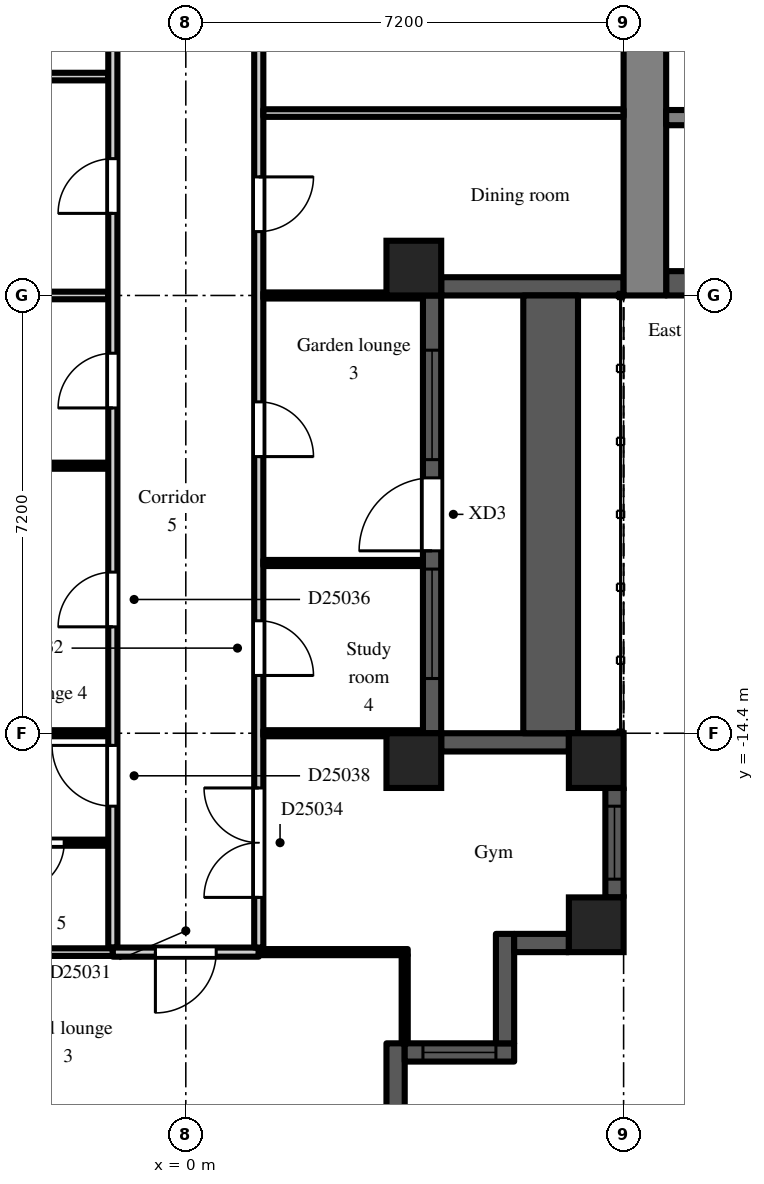
"""IFC4 building model, lengths in metres.
Left out: names, types, materials, properties, quantities, classifications, styles, units other than length and angle.
Written with IfcOpenShell. Run it as: python <this file> out.ifc"""

import sys

from ifc_helpers import new_model, si_unit, direction, frame, frame_2d, origin, origin_2d, place, context, subcontext, project, spatial, rectangle, extrude, element, fill, save


model = new_model("IFC4")
c1 = context("Model", 3, precision=1e-05, world=origin(), true_north=direction((0.0, 1.0)))
c2 = subcontext(c1, "Body", "Model", "MODEL_VIEW")
j1 = project(units=[si_unit("LENGTHUNIT", "METRE"), si_unit("PLANEANGLEUNIT", "RADIAN")], contexts=[c1])
p1 = place(None, origin())
s1 = spatial("IfcSite", under=j1, at=p1, CompositionType="ELEMENT")
p2 = place(p1, origin())
s2 = spatial("IfcBuilding", under=s1, at=p2, CompositionType="ELEMENT")
p3 = place(p2, frame((0.0, 0.0, 170.7)))
s3 = spatial("IfcBuildingStorey", under=s2, at=p3, CompositionType="ELEMENT", Elevation=170.7)
for number, where, z_axis, x_axis in (
    (1, (3.75, -14.85, 0.0), (0.0, 0.0, 1.0), (1.0, 0.0, 0.0)),
    (2, (3.75, -6.75, 0.0), (0.0, 0.0, 1.0), (1.0, 0.0, 0.0)),
    (3, (6.75, -17.55, 0.0), (0.0, 0.0, 1.0), (1.0, 0.0, 0.0)),
    (4, (6.75, -14.85, 0.0), (0.0, 0.0, 1.0), (1.0, 0.0, 0.0)),
):
    element("IfcColumn", number, at=place(p3, frame(where, z_axis=z_axis, x_axis=x_axis)), inside=s3, PredefinedType="COLUMN", context=c2, shape_type="SweptSolid", body=[
        extrude(rectangle(XDim=0.9, YDim=0.9, at=origin_2d()), origin(), (0.0, 0.0, 1.0), 3.0),
    ])
p4 = place(p3, frame((3.45, -20.7, 0.0), z_axis=(0.0, 0.0, 1.0), x_axis=(0.0, 1.0, 0.0)))
e5 = element("IfcWall", 5, at=p4, inside=s3, PredefinedType="SOLIDWALL", context=c2, shape_type="SweptSolid", body=[
    extrude(rectangle(XDim=1.2, YDim=0.3, at=frame_2d((0.6, 0.0))), origin(), (0.0, 0.0, 1.0), 2.6),
])
p5 = place(p3, frame((3.6, -19.65, 0.0), z_axis=(0.0, 0.0, 1.0), x_axis=(1.0, 0.0, 0.0)))
e6 = element("IfcWall", 6, at=p5, inside=s3, PredefinedType="SOLIDWALL", context=c2, shape_type="SweptSolid", body=[
    extrude(rectangle(XDim=1.8, YDim=0.3, at=frame_2d((0.9, 0.0))), origin(), (0.0, 0.0, 1.0), 2.6),
])
p6 = place(p5, frame((0.3, 0.0, 0.2)))
e7 = element("IfcOpeningElement", 7, at=p6, cuts=e6, PredefinedType="OPENING", context=c2, shape_type="SweptSolid", body=[
    extrude(rectangle(XDim=1.2, YDim=1.85, at=frame_2d((0.6, 0.925))), frame((0.0, 0.16, 0.0), z_axis=(0.0, -1.0, 0.0), x_axis=(1.0, 0.0, 0.0)), (0.0, 0.0, 1.0), 0.32),
])
p7 = place(p3, frame((5.25, -19.5, 0.0), z_axis=(0.0, 0.0, 1.0), x_axis=(0.0, 1.0, 0.0)))
e8 = element("IfcWall", 8, at=p7, inside=s3, PredefinedType="SOLIDWALL", context=c2, shape_type="SweptSolid", body=[
    extrude(rectangle(XDim=1.8, YDim=0.3, at=frame_2d((0.9, 0.0))), origin(), (0.0, 0.0, 1.0), 2.6),
])
p8 = place(p3, frame((5.4, -17.85, 0.0), z_axis=(0.0, 0.0, 1.0), x_axis=(1.0, 0.0, 0.0)))
e9 = element("IfcWall", 9, at=p8, inside=s3, PredefinedType="SOLIDWALL", context=c2, shape_type="SweptSolid", body=[
    extrude(rectangle(XDim=0.9, YDim=0.3, at=frame_2d((0.45, 0.0))), origin(), (0.0, 0.0, 1.0), 2.6),
])
p9 = place(p3, frame((7.05, -17.1, 0.0), z_axis=(0.0, 0.0, 1.0), x_axis=(0.0, 1.0, 0.0)))
e10 = element("IfcWall", 10, at=p9, inside=s3, PredefinedType="SOLIDWALL", context=c2, shape_type="SweptSolid", body=[
    extrude(rectangle(XDim=1.8, YDim=0.3, at=frame_2d((0.9, 0.0))), origin(), (0.0, 0.0, 1.0), 2.2),
])
p10 = place(p9, frame((0.3, 0.0, 0.2)))
e11 = element("IfcOpeningElement", 11, at=p10, cuts=e10, PredefinedType="OPENING", context=c2, shape_type="SweptSolid", body=[
    extrude(rectangle(XDim=1.2, YDim=1.85, at=frame_2d((0.6, 0.925))), frame((0.0, 0.16, 0.0), z_axis=(0.0, -1.0, 0.0), x_axis=(1.0, 0.0, 0.0)), (0.0, 0.0, 1.0), 0.32),
])
p11 = place(p3, frame((6.3, -14.55, 0.0), z_axis=(0.0, 0.0, 1.0), x_axis=(-1.0, 0.0, 0.0)))
e12 = element("IfcWall", 12, at=p11, inside=s3, PredefinedType="SOLIDWALL", context=c2, shape_type="SweptSolid", body=[
    extrude(rectangle(XDim=2.1, YDim=0.3, at=frame_2d((1.05, 0.0))), origin(), (0.0, 0.0, 1.0), 2.2),
])
p12 = place(p3, frame((4.05, -14.4, 0.0), z_axis=(0.0, 0.0, 1.0), x_axis=(0.0, 1.0, 0.0)))
e13 = element("IfcWall", 13, at=p12, inside=s3, PredefinedType="SOLIDWALL", context=c2, shape_type="SweptSolid", body=[
    extrude(rectangle(XDim=7.2, YDim=0.3, at=frame_2d((3.6, 0.0))), origin(), (0.0, 0.0, 1.0), 2.2),
])
p13 = place(p12, frame((3.0, 0.0, 0.0)))
e14 = element("IfcOpeningElement", 14, at=p13, cuts=e13, PredefinedType="OPENING", context=c2, shape_type="SweptSolid", body=[
    extrude(rectangle(XDim=1.2, YDim=2.05, at=frame_2d((0.6, 1.025))), frame((0.0, 0.16, 0.0), z_axis=(0.0, -1.0, 0.0), x_axis=(1.0, 0.0, 0.0)), (0.0, 0.0, 1.0), 0.32),
])
p14 = place(p12, frame((0.9, 0.0, 0.2)))
e15 = element("IfcOpeningElement", 15, at=p14, cuts=e13, PredefinedType="OPENING", context=c2, shape_type="SweptSolid", body=[
    extrude(rectangle(XDim=1.8, YDim=1.85, at=frame_2d((0.9, 0.925))), frame((0.0, 0.16, 0.0), z_axis=(0.0, -1.0, 0.0), x_axis=(1.0, 0.0, 0.0)), (0.0, 0.0, 1.0), 0.32),
])
p15 = place(p12, frame((4.5, 0.0, 0.2)))
e16 = element("IfcOpeningElement", 16, at=p15, cuts=e13, PredefinedType="OPENING", context=c2, shape_type="SweptSolid", body=[
    extrude(rectangle(XDim=1.8, YDim=1.85, at=frame_2d((0.9, 0.925))), frame((0.0, 0.16, 0.0), z_axis=(0.0, -1.0, 0.0), x_axis=(1.0, 0.0, 0.0)), (0.0, 0.0, 1.0), 0.32),
])
p16 = place(p3, frame((4.2, -7.05, 0.0), z_axis=(0.0, 0.0, 1.0), x_axis=(1.0, 0.0, 0.0)))
e17 = element("IfcWall", 17, at=p16, inside=s3, PredefinedType="SOLIDWALL", context=c2, shape_type="SweptSolid", body=[
    extrude(rectangle(XDim=3.0, YDim=0.3, at=frame_2d((1.5, 0.0))), origin(), (0.0, 0.0, 1.0), 2.2),
])
p17 = place(p3, frame((6.0, -14.4, 0.0), z_axis=(0.0, 0.0, 1.0), x_axis=(0.0, 1.0, 0.0)))
e18 = element("IfcWall", 18, at=p17, inside=s3, PredefinedType="PARAPET", context=c2, shape_type="SweptSolid", body=[
    extrude(rectangle(XDim=7.2, YDim=0.9, at=frame_2d((3.6, 0.0))), origin(), (0.0, 0.0, 1.0), 0.8),
])
p18 = place(p3, frame((7.55, -7.2, 0.0), z_axis=(0.0, 0.0, 1.0), x_axis=(0.0, 1.0, 0.0)))
e19 = element("IfcWall", 19, at=p18, inside=s3, PredefinedType="SHEAR", context=c2, shape_type="SweptSolid", body=[
    extrude(rectangle(XDim=14.4, YDim=0.7, at=frame_2d((7.2, 0.0))), origin(), (0.0, 0.0, 1.0), 2.6),
])
p19 = place(p18, frame((6.0, 0.0, 0.0)))
e20 = element("IfcOpeningElement", 20, at=p19, cuts=e19, PredefinedType="OPENING", context=c2, shape_type="SweptSolid", body=[
    extrude(rectangle(XDim=2.4, YDim=2.2, at=frame_2d((1.2, 1.1))), frame((0.0, 0.36, 0.0), z_axis=(0.0, -1.0, 0.0), x_axis=(1.0, 0.0, 0.0)), (0.0, 0.0, 1.0), 0.72),
])
p20 = place(p3, frame((7.9, -7.0, 0.0), z_axis=(0.0, 0.0, 1.0), x_axis=(1.0, 0.0, 0.0)))
e21 = element("IfcWall", 21, at=p20, inside=s3, PredefinedType="SHEAR", context=c2, shape_type="SweptSolid", body=[
    extrude(rectangle(XDim=12.95, YDim=0.4, at=frame_2d((6.475, 0.0))), origin(), (0.0, 0.0, 1.0), 2.6),
])
p21 = place(p3, frame((7.9, -4.275, 0.0), z_axis=(0.0, 0.0, 1.0), x_axis=(1.0, 0.0, 0.0)))
e22 = element("IfcWall", 22, at=p21, inside=s3, PredefinedType="SHEAR", context=c2, shape_type="SweptSolid", body=[
    extrude(rectangle(XDim=1.95, YDim=0.25, at=frame_2d((0.975, 0.0))), origin(), (0.0, 0.0, 1.0), 2.6),
])
p22 = place(p3, frame((-5.938, -3.6, 0.0), z_axis=(0.0, 0.0, 1.0), x_axis=(1.0, 0.0, 0.0)))
e23 = element("IfcWall", 23, at=p22, inside=s3, PredefinedType="PARTITIONING", context=c2, shape_type="SweptSolid", body=[
    extrude(rectangle(XDim=4.663, YDim=0.125, at=frame_2d((2.331, 0.0))), origin(), (0.0, 0.0, 1.0), 2.6),
])
for number, where, z_axis, x_axis in (
    (24, (-3.9, -14.4, 0.0), (0.0, 0.0, 1.0), (1.0, 0.0, 0.0)),
    (25, (-3.9, -10.0, 0.0), (0.0, 0.0, 1.0), (1.0, 0.0, 0.0)),
):
    element("IfcWall", number, at=place(p3, frame(where, z_axis=z_axis, x_axis=x_axis)), inside=s3, PredefinedType="PARTITIONING", context=c2, shape_type="SweptSolid", body=[
        extrude(rectangle(XDim=2.625, YDim=0.1, at=frame_2d((1.312, 0.0))), origin(), (0.0, 0.0, 1.0), 2.6),
    ])
p23 = place(p3, frame((-3.9, -7.2, 0.0), z_axis=(0.0, 0.0, 1.0), x_axis=(1.0, 0.0, 0.0)))
e26 = element("IfcWall", 26, at=p23, inside=s3, PredefinedType="PARTITIONING", context=c2, shape_type="SweptSolid", body=[
    extrude(rectangle(XDim=2.625, YDim=0.125, at=frame_2d((1.312, 0.0))), origin(), (0.0, 0.0, 1.0), 2.6),
])
p24 = place(p3, frame((-3.55, -18.0, 0.0), z_axis=(0.0, 0.0, 1.0), x_axis=(1.0, 0.0, 0.0)))
e27 = element("IfcWall", 27, at=p24, inside=s3, PredefinedType="PARTITIONING", context=c2, shape_type="SweptSolid", body=[
    extrude(rectangle(XDim=2.35, YDim=0.125, at=frame_2d((1.175, 0.0))), origin(), (0.0, 0.0, 1.0), 2.6),
])
p25 = place(p3, frame((-3.55, -16.2, 0.0), z_axis=(0.0, 0.0, 1.0), x_axis=(1.0, 0.0, 0.0)))
e28 = element("IfcWall", 28, at=p25, inside=s3, PredefinedType="PARTITIONING", context=c2, shape_type="SweptSolid", body=[
    extrude(rectangle(XDim=2.275, YDim=0.1, at=frame_2d((1.138, 0.0))), origin(), (0.0, 0.0, 1.0), 2.6),
])
p26 = place(p25, frame((0.75, 0.0, 0.0)))
e29 = element("IfcOpeningElement", 29, at=p26, cuts=e28, PredefinedType="OPENING", context=c2, shape_type="SweptSolid", body=[
    extrude(rectangle(XDim=0.8, YDim=2.1, at=frame_2d((0.4, 1.05))), frame((0.0, 0.06, 0.0), z_axis=(0.0, -1.0, 0.0), x_axis=(1.0, 0.0, 0.0)), (0.0, 0.0, 1.0), 0.12),
])
p27 = place(p3, frame((-1.2, -17.925, 0.0), z_axis=(0.0, 0.0, 1.0), x_axis=(0.0, 1.0, 0.0)))
e30 = element("IfcWall", 30, at=p27, inside=s3, PredefinedType="PARTITIONING", context=c2, shape_type="SweptSolid", body=[
    extrude(rectangle(XDim=16.65, YDim=0.15, at=frame_2d((8.325, 0.0))), origin(), (0.0, 0.0, 1.0), 2.6),
])
p28 = place(p27, frame((15.075, 0.0, 0.0)))
e31 = element("IfcOpeningElement", 31, at=p28, cuts=e30, PredefinedType="OPENING", context=c2, shape_type="SweptSolid", body=[
    extrude(rectangle(XDim=0.9, YDim=2.1, at=frame_2d((0.45, 1.05))), frame((0.0, 0.085, 0.0), z_axis=(0.0, -1.0, 0.0), x_axis=(1.0, 0.0, 0.0)), (0.0, 0.0, 1.0), 0.17),
])
p29 = place(p27, frame((12.075, 0.0, 0.0)))
e32 = element("IfcOpeningElement", 32, at=p29, cuts=e30, PredefinedType="OPENING", context=c2, shape_type="SweptSolid", body=[
    extrude(rectangle(XDim=0.9, YDim=2.1, at=frame_2d((0.45, 1.05))), frame((0.0, 0.085, 0.0), z_axis=(0.0, -1.0, 0.0), x_axis=(1.0, 0.0, 0.0)), (0.0, 0.0, 1.0), 0.17),
])
p30 = place(p27, frame((8.875, 0.0, 0.0)))
e33 = element("IfcOpeningElement", 33, at=p30, cuts=e30, PredefinedType="OPENING", context=c2, shape_type="SweptSolid", body=[
    extrude(rectangle(XDim=0.9, YDim=2.1, at=frame_2d((0.45, 1.05))), frame((0.0, 0.085, 0.0), z_axis=(0.0, -1.0, 0.0), x_axis=(1.0, 0.0, 0.0)), (0.0, 0.0, 1.0), 0.17),
])
p31 = place(p27, frame((5.275, 0.0, 0.0)))
e34 = element("IfcOpeningElement", 34, at=p31, cuts=e30, PredefinedType="OPENING", context=c2, shape_type="SweptSolid", body=[
    extrude(rectangle(XDim=0.9, YDim=2.1, at=frame_2d((0.45, 1.05))), frame((0.0, 0.085, 0.0), z_axis=(0.0, -1.0, 0.0), x_axis=(1.0, 0.0, 0.0)), (0.0, 0.0, 1.0), 0.17),
])
p32 = place(p27, frame((2.325, 0.0, 0.0)))
e35 = element("IfcOpeningElement", 35, at=p32, cuts=e30, PredefinedType="OPENING", context=c2, shape_type="SweptSolid", body=[
    extrude(rectangle(XDim=1.0, YDim=2.1, at=frame_2d((0.5, 1.05))), frame((0.0, 0.085, 0.0), z_axis=(0.0, -1.0, 0.0), x_axis=(1.0, 0.0, 0.0)), (0.0, 0.0, 1.0), 0.17),
])
p33 = place(p3, frame((-1.2, -18.0, 0.0), z_axis=(0.0, 0.0, 1.0), x_axis=(1.0, 0.0, 0.0)))
e36 = element("IfcWall", 36, at=p33, inside=s3, PredefinedType="PARTITIONING", context=c2, shape_type="SweptSolid", body=[
    extrude(rectangle(XDim=2.4, YDim=0.15, at=frame_2d((1.2, 0.0))), origin(), (0.0, 0.0, 1.0), 2.6),
])
p34 = place(p33, frame((0.7, 0.0, 0.0)))
e37 = element("IfcOpeningElement", 37, at=p34, cuts=e36, PredefinedType="OPENING", context=c2, shape_type="SweptSolid", body=[
    extrude(rectangle(XDim=1.0, YDim=2.1, at=frame_2d((0.5, 1.05))), frame((0.0, 0.085, 0.0), z_axis=(0.0, -1.0, 0.0), x_axis=(1.0, 0.0, 0.0)), (0.0, 0.0, 1.0), 0.17),
])
p35 = place(p3, frame((1.2, -17.925, 0.0), z_axis=(0.0, 0.0, 1.0), x_axis=(0.0, 1.0, 0.0)))
e38 = element("IfcWall", 38, at=p35, inside=s3, PredefinedType="PARTITIONING", context=c2, shape_type="SweptSolid", body=[
    extrude(rectangle(XDim=16.8, YDim=0.15, at=frame_2d((8.4, 0.0))), origin(), (0.0, 0.0, 1.0), 2.6),
])
p36 = place(p35, frame((11.775, 0.0, 0.0)))
e39 = element("IfcOpeningElement", 39, at=p36, cuts=e38, PredefinedType="OPENING", context=c2, shape_type="SweptSolid", body=[
    extrude(rectangle(XDim=0.9, YDim=2.1, at=frame_2d((0.45, 1.05))), frame((0.0, 0.085, 0.0), z_axis=(0.0, -1.0, 0.0), x_axis=(1.0, 0.0, 0.0)), (0.0, 0.0, 1.0), 0.17),
])
p37 = place(p35, frame((4.475, 0.0, 0.0)))
e40 = element("IfcOpeningElement", 40, at=p37, cuts=e38, PredefinedType="OPENING", context=c2, shape_type="SweptSolid", body=[
    extrude(rectangle(XDim=0.9, YDim=2.1, at=frame_2d((0.45, 1.05))), frame((0.0, 0.085, 0.0), z_axis=(0.0, -1.0, 0.0), x_axis=(1.0, 0.0, 0.0)), (0.0, 0.0, 1.0), 0.17),
])
p38 = place(p35, frame((8.075, 0.0, 0.0)))
e41 = element("IfcOpeningElement", 41, at=p38, cuts=e38, PredefinedType="OPENING", context=c2, shape_type="SweptSolid", body=[
    extrude(rectangle(XDim=0.9, YDim=2.1, at=frame_2d((0.45, 1.05))), frame((0.0, 0.085, 0.0), z_axis=(0.0, -1.0, 0.0), x_axis=(1.0, 0.0, 0.0)), (0.0, 0.0, 1.0), 0.17),
])
p39 = place(p35, frame((0.825, 0.0, 0.0)))
e42 = element("IfcOpeningElement", 42, at=p39, cuts=e38, PredefinedType="OPENING", context=c2, shape_type="SweptSolid", body=[
    extrude(rectangle(XDim=1.8, YDim=2.1, at=frame_2d((0.9, 1.05))), frame((0.0, 0.085, 0.0), z_axis=(0.0, -1.0, 0.0), x_axis=(1.0, 0.0, 0.0)), (0.0, 0.0, 1.0), 0.17),
])
p40 = place(p3, frame((1.2, -18.0, 0.0), z_axis=(0.0, 0.0, 1.0), x_axis=(1.0, 0.0, 0.0)))
e43 = element("IfcWall", 43, at=p40, inside=s3, PredefinedType="PARTITIONING", context=c2, shape_type="SweptSolid", body=[
    extrude(rectangle(XDim=2.45, YDim=0.1, at=frame_2d((1.225, 0.0))), origin(), (0.0, 0.0, 1.0), 2.6),
])
for number, where, z_axis, x_axis in (
    (44, (1.275, -14.4, 0.0), (0.0, 0.0, 1.0), (1.0, 0.0, 0.0)),
    (45, (1.275, -11.6, 0.0), (0.0, 0.0, 1.0), (1.0, 0.0, 0.0)),
    (46, (1.275, -7.2, 0.0), (0.0, 0.0, 1.0), (1.0, 0.0, 0.0)),
):
    element("IfcWall", number, at=place(p3, frame(where, z_axis=z_axis, x_axis=x_axis)), inside=s3, PredefinedType="PARTITIONING", context=c2, shape_type="SweptSolid", body=[
        extrude(rectangle(XDim=2.625, YDim=0.1, at=frame_2d((1.312, 0.0))), origin(), (0.0, 0.0, 1.0), 2.6),
    ])
p41 = place(p3, frame((1.275, -4.2, 0.0), z_axis=(0.0, 0.0, 1.0), x_axis=(1.0, 0.0, 0.0)))
e47 = element("IfcWall", 47, at=p41, inside=s3, PredefinedType="PARTITIONING", context=c2, shape_type="SweptSolid", body=[
    extrude(rectangle(XDim=5.925, YDim=0.125, at=frame_2d((2.962, 0.0))), origin(), (0.0, 0.0, 1.0), 2.6),
])
p42 = place(p3, frame((3.6, -19.5, 0.0), z_axis=(0.0, 0.0, 1.0), x_axis=(0.0, 1.0, 0.0)))
e48 = element("IfcWall", 48, at=p42, inside=s3, PredefinedType="PARTITIONING", context=c2, shape_type="SweptSolid", body=[
    extrude(rectangle(XDim=1.45, YDim=0.1, at=frame_2d((0.725, 0.0))), origin(), (0.0, 0.0, 1.0), 2.6),
])
p43 = place(p6, origin())
e49 = element("IfcWindow", 49, at=p43, inside=s3, PartitioningType="SINGLE_PANEL", PredefinedType="WINDOW", context=c2, shape_type="SweptSolid", body=[
    extrude(rectangle(XDim=1.2, YDim=1.85, at=frame_2d((0.6, 0.925))), frame((0.0, 0.03, 0.0), z_axis=(0.0, -1.0, 0.0), x_axis=(1.0, 0.0, 0.0)), (0.0, 0.0, 1.0), 0.06),
])
fill(e7, e49)
p44 = place(p10, origin())
e50 = element("IfcWindow", 50, at=p44, inside=s3, PartitioningType="SINGLE_PANEL", PredefinedType="WINDOW", context=c2, shape_type="SweptSolid", body=[
    extrude(rectangle(XDim=1.2, YDim=1.85, at=frame_2d((0.6, 0.925))), frame((0.0, 0.03, 0.0), z_axis=(0.0, -1.0, 0.0), x_axis=(1.0, 0.0, 0.0)), (0.0, 0.0, 1.0), 0.06),
])
fill(e11, e50)
p45 = place(p13, origin())
e51 = element("IfcDoor", 51, at=p45, inside=s3, OperationType="SINGLE_SWING_LEFT", PredefinedType="DOOR", context=c2, shape_type="SweptSolid", body=[
    extrude(rectangle(XDim=1.2, YDim=2.05, at=frame_2d((0.6, 1.025))), frame((0.0, 0.025, 0.0), z_axis=(0.0, -1.0, 0.0), x_axis=(1.0, 0.0, 0.0)), (0.0, 0.0, 1.0), 0.05),
])
fill(e14, e51)
p46 = place(p14, origin())
e52 = element("IfcWindow", 52, at=p46, inside=s3, PartitioningType="SINGLE_PANEL", PredefinedType="WINDOW", context=c2, shape_type="SweptSolid", body=[
    extrude(rectangle(XDim=1.8, YDim=1.85, at=frame_2d((0.9, 0.925))), frame((0.0, 0.03, 0.0), z_axis=(0.0, -1.0, 0.0), x_axis=(1.0, 0.0, 0.0)), (0.0, 0.0, 1.0), 0.06),
])
fill(e15, e52)
p47 = place(p15, origin())
e53 = element("IfcWindow", 53, at=p47, inside=s3, PartitioningType="SINGLE_PANEL", PredefinedType="WINDOW", context=c2, shape_type="SweptSolid", body=[
    extrude(rectangle(XDim=1.8, YDim=1.85, at=frame_2d((0.9, 0.925))), frame((0.0, 0.03, 0.0), z_axis=(0.0, -1.0, 0.0), x_axis=(1.0, 0.0, 0.0)), (0.0, 0.0, 1.0), 0.06),
])
fill(e16, e53)
p48 = place(p36, frame((0.9, 0.0, 0.0), z_axis=(0.0, 0.0, 1.0), x_axis=(-1.0, 0.0, 0.0)))
e54 = element("IfcDoor", 54, at=p48, inside=s3, OperationType="SINGLE_SWING_LEFT", PredefinedType="DOOR", context=c2, shape_type="SweptSolid", body=[
    extrude(rectangle(XDim=0.9, YDim=2.1, at=frame_2d((0.45, 1.05))), frame((0.0, 0.025, 0.0), z_axis=(0.0, -1.0, 0.0), x_axis=(1.0, 0.0, 0.0)), (0.0, 0.0, 1.0), 0.05),
])
fill(e39, e54)
p49 = place(p29, origin())
e55 = element("IfcDoor", 55, at=p49, inside=s3, OperationType="SINGLE_SWING_LEFT", PredefinedType="DOOR", context=c2, shape_type="SweptSolid", body=[
    extrude(rectangle(XDim=0.9, YDim=2.1, at=frame_2d((0.45, 1.05))), frame((0.0, 0.025, 0.0), z_axis=(0.0, -1.0, 0.0), x_axis=(1.0, 0.0, 0.0)), (0.0, 0.0, 1.0), 0.05),
])
fill(e32, e55)
p50 = place(p34, frame((1.0, 0.0, 0.0), z_axis=(0.0, 0.0, 1.0), x_axis=(-1.0, 0.0, 0.0)))
e56 = element("IfcDoor", 56, at=p50, inside=s3, OperationType="SINGLE_SWING_RIGHT", PredefinedType="DOOR", context=c2, shape_type="SweptSolid", body=[
    extrude(rectangle(XDim=1.0, YDim=2.1, at=frame_2d((0.5, 1.05))), frame((0.0, 0.025, 0.0), z_axis=(0.0, -1.0, 0.0), x_axis=(1.0, 0.0, 0.0)), (0.0, 0.0, 1.0), 0.05),
])
fill(e37, e56)
p51 = place(p37, frame((0.9, 0.0, 0.0), z_axis=(0.0, 0.0, 1.0), x_axis=(-1.0, 0.0, 0.0)))
e57 = element("IfcDoor", 57, at=p51, inside=s3, OperationType="SINGLE_SWING_RIGHT", PredefinedType="DOOR", context=c2, shape_type="SweptSolid", body=[
    extrude(rectangle(XDim=0.9, YDim=2.1, at=frame_2d((0.45, 1.05))), frame((0.0, 0.025, 0.0), z_axis=(0.0, -1.0, 0.0), x_axis=(1.0, 0.0, 0.0)), (0.0, 0.0, 1.0), 0.05),
])
fill(e40, e57)
p52 = place(p38, frame((0.9, 0.0, 0.0), z_axis=(0.0, 0.0, 1.0), x_axis=(-1.0, 0.0, 0.0)))
e58 = element("IfcDoor", 58, at=p52, inside=s3, OperationType="SINGLE_SWING_RIGHT", PredefinedType="DOOR", context=c2, shape_type="SweptSolid", body=[
    extrude(rectangle(XDim=0.9, YDim=2.1, at=frame_2d((0.45, 1.05))), frame((0.0, 0.025, 0.0), z_axis=(0.0, -1.0, 0.0), x_axis=(1.0, 0.0, 0.0)), (0.0, 0.0, 1.0), 0.05),
])
fill(e41, e58)
p53 = place(p39, origin())
e59 = element("IfcDoor", 59, at=p53, inside=s3, OperationType="DOUBLE_DOOR_DOUBLE_SWING", PredefinedType="DOOR", context=c2, shape_type="SweptSolid", body=[
    extrude(rectangle(XDim=1.8, YDim=2.1, at=frame_2d((0.9, 1.05))), frame((0.0, 0.025, 0.0), z_axis=(0.0, -1.0, 0.0), x_axis=(1.0, 0.0, 0.0)), (0.0, 0.0, 1.0), 0.05),
])
fill(e42, e59)
p54 = place(p30, origin())
e60 = element("IfcDoor", 60, at=p54, inside=s3, OperationType="SINGLE_SWING_LEFT", PredefinedType="DOOR", context=c2, shape_type="SweptSolid", body=[
    extrude(rectangle(XDim=0.9, YDim=2.1, at=frame_2d((0.45, 1.05))), frame((0.0, 0.025, 0.0), z_axis=(0.0, -1.0, 0.0), x_axis=(1.0, 0.0, 0.0)), (0.0, 0.0, 1.0), 0.05),
])
fill(e33, e60)
p55 = place(p31, origin())
e61 = element("IfcDoor", 61, at=p55, inside=s3, OperationType="SINGLE_SWING_LEFT", PredefinedType="DOOR", context=c2, shape_type="SweptSolid", body=[
    extrude(rectangle(XDim=0.9, YDim=2.1, at=frame_2d((0.45, 1.05))), frame((0.0, 0.025, 0.0), z_axis=(0.0, -1.0, 0.0), x_axis=(1.0, 0.0, 0.0)), (0.0, 0.0, 1.0), 0.05),
])
fill(e34, e61)
p56 = place(p26, frame((0.8, 0.0, 0.0), z_axis=(0.0, 0.0, 1.0), x_axis=(-1.0, 0.0, 0.0)))
e62 = element("IfcDoor", 62, at=p56, inside=s3, OperationType="SINGLE_SWING_RIGHT", PredefinedType="DOOR", context=c2, shape_type="SweptSolid", body=[
    extrude(rectangle(XDim=0.8, YDim=2.1, at=frame_2d((0.4, 1.05))), frame((0.0, 0.025, 0.0), z_axis=(0.0, -1.0, 0.0), x_axis=(1.0, 0.0, 0.0)), (0.0, 0.0, 1.0), 0.05),
])
fill(e29, e62)
p57 = place(p32, origin())
e63 = element("IfcDoor", 63, at=p57, inside=s3, OperationType="SINGLE_SWING_RIGHT", PredefinedType="DOOR", context=c2, shape_type="SweptSolid", body=[
    extrude(rectangle(XDim=1.0, YDim=2.1, at=frame_2d((0.5, 1.05))), frame((0.0, 0.025, 0.0), z_axis=(0.0, -1.0, 0.0), x_axis=(1.0, 0.0, 0.0)), (0.0, 0.0, 1.0), 0.05),
])
fill(e35, e63)
save(model, sys.argv[1])
